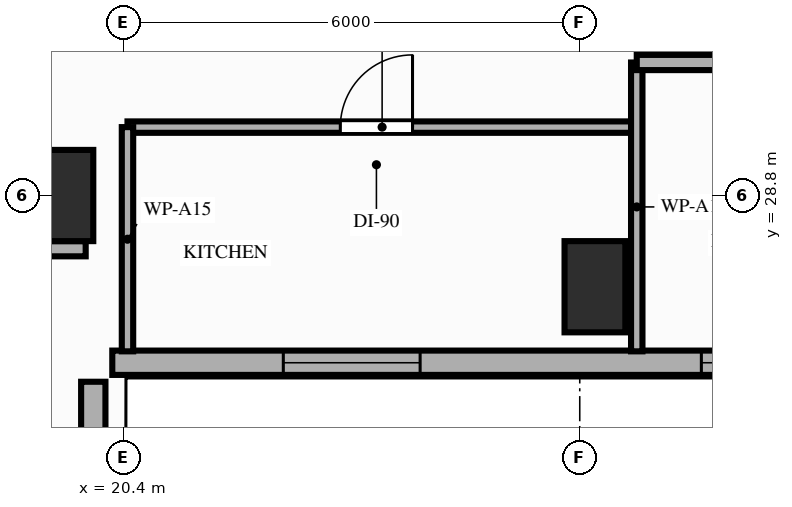
"""IFC4 building model, lengths in metres.
Left out: names, types, materials, properties, quantities, classifications, styles, units other than length and angle.
Written with IfcOpenShell. Run it as: python <this file> out.ifc"""

import sys

from ifc_helpers import new_model, si_unit, direction, frame, frame_2d, origin, origin_2d, place, context, subcontext, project, spatial, rectangle, extrude, element, fill, save


model = new_model("IFC4")
c1 = context("Model", 3, precision=1e-05, world=origin(), true_north=direction((0.0, 1.0)))
c2 = subcontext(c1, "Body", "Model", "MODEL_VIEW")
j1 = project(units=[si_unit("LENGTHUNIT", "METRE"), si_unit("PLANEANGLEUNIT", "RADIAN")], contexts=[c1])
p1 = place(None, origin())
s1 = spatial("IfcSite", under=j1, at=p1, CompositionType="ELEMENT")
p2 = place(p1, origin())
s2 = spatial("IfcBuilding", under=s1, at=p2, CompositionType="ELEMENT")
p3 = place(p2, frame((0.0, 0.0, 99.4)))
s3 = spatial("IfcBuildingStorey", under=s2, at=p3, CompositionType="ELEMENT", Elevation=99.4)
for number, where, z_axis, x_axis in (
    (1, (19.6, 28.8, 0.0), (0.0, 0.0, 1.0), (1.0, 0.0, 0.0)),
    (2, (26.6, 27.6, 0.0), (0.0, 0.0, 1.0), (1.0, 0.0, 0.0)),
):
    element("IfcColumn", number, at=place(p3, frame(where, z_axis=z_axis, x_axis=x_axis)), inside=s3, PredefinedType="COLUMN", context=c2, shape_type="SweptSolid", body=[
        extrude(rectangle(XDim=0.8, YDim=1.2, at=origin_2d()), origin(), (0.0, 0.0, 1.0), 3.2),
    ])
p4 = place(p3, frame((20.0, 8.8, 0.0), z_axis=(0.0, 0.0, 1.0), x_axis=(0.0, 1.0, 0.0)))
e3 = element("IfcWall", 3, at=p4, inside=s3, PredefinedType="STANDARD", context=c2, shape_type="SweptSolid", body=[
    extrude(rectangle(XDim=17.55, YDim=0.32, at=frame_2d((8.775, 0.0))), origin(), (0.0, 0.0, 1.0), 2.35),
])
p5 = place(p4, frame((7.22, 0.0, 0.85)))
e4 = element("IfcOpeningElement", 4, at=p5, cuts=e3, PredefinedType="OPENING", context=c2, shape_type="SweptSolid", body=[
    extrude(rectangle(XDim=1.1, YDim=1.25, at=frame_2d((0.55, 0.625))), frame((0.0, 0.17, 0.0), z_axis=(0.0, -1.0, 0.0), x_axis=(1.0, 0.0, 0.0)), (0.0, 0.0, 1.0), 0.34),
])
p6 = place(p4, frame((11.0, 0.0, 0.85)))
e5 = element("IfcOpeningElement", 5, at=p6, cuts=e3, PredefinedType="OPENING", context=c2, shape_type="SweptSolid", body=[
    extrude(rectangle(XDim=1.8, YDim=1.25, at=frame_2d((0.9, 0.625))), frame((0.0, 0.17, 0.0), z_axis=(0.0, -1.0, 0.0), x_axis=(1.0, 0.0, 0.0)), (0.0, 0.0, 1.0), 0.34),
])
p7 = place(p3, frame((20.25, 26.6, 0.0), z_axis=(0.0, 0.0, 1.0), x_axis=(1.0, 0.0, 0.0)))
e6 = element("IfcWall", 6, at=p7, inside=s3, PredefinedType="STANDARD", context=c2, shape_type="SweptSolid", body=[
    extrude(rectangle(XDim=26.15, YDim=0.32, at=frame_2d((13.075, 0.0))), origin(), (0.0, 0.0, 1.0), 2.96),
])
p8 = place(p7, frame((14.43, 0.0, 0.0)))
e7 = element("IfcOpeningElement", 7, at=p8, cuts=e6, PredefinedType="OPENING", context=c2, shape_type="SweptSolid", body=[
    extrude(rectangle(XDim=1.4, YDim=2.1, at=frame_2d((0.7, 1.05))), frame((0.0, 0.17, 0.0), z_axis=(0.0, -1.0, 0.0), x_axis=(1.0, 0.0, 0.0)), (0.0, 0.0, 1.0), 0.34),
])
p9 = place(p7, frame((2.25, 0.0, 0.85)))
e8 = element("IfcOpeningElement", 8, at=p9, cuts=e6, PredefinedType="OPENING", context=c2, shape_type="SweptSolid", body=[
    extrude(rectangle(XDim=1.8, YDim=1.75, at=frame_2d((0.9, 0.875))), frame((0.0, 0.17, 0.0), z_axis=(0.0, -1.0, 0.0), x_axis=(1.0, 0.0, 0.0)), (0.0, 0.0, 1.0), 0.34),
])
p10 = place(p7, frame((7.75, 0.0, 0.85)))
e9 = element("IfcOpeningElement", 9, at=p10, cuts=e6, PredefinedType="OPENING", context=c2, shape_type="SweptSolid", body=[
    extrude(rectangle(XDim=1.8, YDim=1.75, at=frame_2d((0.9, 0.875))), frame((0.0, 0.17, 0.0), z_axis=(0.0, -1.0, 0.0), x_axis=(1.0, 0.0, 0.0)), (0.0, 0.0, 1.0), 0.34),
])
p11 = place(p7, frame((22.25, 0.0, 0.85)))
e10 = element("IfcOpeningElement", 10, at=p11, cuts=e6, PredefinedType="OPENING", context=c2, shape_type="SweptSolid", body=[
    extrude(rectangle(XDim=1.8, YDim=1.75, at=frame_2d((0.9, 0.875))), frame((0.0, 0.17, 0.0), z_axis=(0.0, -1.0, 0.0), x_axis=(1.0, 0.0, 0.0)), (0.0, 0.0, 1.0), 0.34),
])
p12 = place(p3, frame((9.06, 28.1, 0.0), z_axis=(0.0, 0.0, 1.0), x_axis=(1.0, 0.0, 0.0)))
e11 = element("IfcWall", 11, at=p12, inside=s3, PredefinedType="PARTITIONING", context=c2, shape_type="SweptSolid", body=[
    extrude(rectangle(XDim=10.84, YDim=0.2, at=frame_2d((5.42, 0.0))), origin(), (0.0, 0.0, 1.0), 2.35),
])
p13 = place(p3, frame((20.45, 29.7, 0.0), z_axis=(0.0, 0.0, 1.0), x_axis=(1.0, 0.0, 0.0)))
e12 = element("IfcWall", 12, at=p13, inside=s3, PredefinedType="PARTITIONING", context=c2, shape_type="SweptSolid", body=[
    extrude(rectangle(XDim=6.7, YDim=0.15, at=frame_2d((3.35, 0.0))), origin(), (0.0, 0.0, 1.0), 2.96),
])
p14 = place(p13, frame((2.8, 0.0, 0.0)))
e13 = element("IfcOpeningElement", 13, at=p14, cuts=e12, PredefinedType="OPENING", context=c2, shape_type="SweptSolid", body=[
    extrude(rectangle(XDim=0.95, YDim=2.15, at=frame_2d((0.475, 1.075))), frame((0.0, 0.085, 0.0), z_axis=(0.0, -1.0, 0.0), x_axis=(1.0, 0.0, 0.0)), (0.0, 0.0, 1.0), 0.17),
])
p15 = place(p3, frame((20.45, 26.75, 0.0), z_axis=(0.0, 0.0, 1.0), x_axis=(0.0, 1.0, 0.0)))
e14 = element("IfcWall", 14, at=p15, inside=s3, PredefinedType="PARTITIONING", context=c2, shape_type="SweptSolid", body=[
    extrude(rectangle(XDim=2.95, YDim=0.15, at=frame_2d((1.475, 0.0))), origin(), (0.0, 0.0, 1.0), 2.35),
])
p16 = place(p3, frame((27.15, 26.75, 0.0), z_axis=(0.0, 0.0, 1.0), x_axis=(0.0, 1.0, 0.0)))
e15 = element("IfcWall", 15, at=p16, inside=s3, PredefinedType="PARTITIONING", context=c2, shape_type="SweptSolid", body=[
    extrude(rectangle(XDim=3.8, YDim=0.15, at=frame_2d((1.9, 0.0))), origin(), (0.0, 0.0, 1.0), 2.35),
])
p17 = place(p3, frame((27.15, 30.55, 0.0), z_axis=(0.0, 0.0, 1.0), x_axis=(1.0, 0.0, 0.0)))
e16 = element("IfcWall", 16, at=p17, inside=s3, PredefinedType="PARTITIONING", context=c2, shape_type="SweptSolid", body=[
    extrude(rectangle(XDim=14.55, YDim=0.2, at=frame_2d((7.275, 0.0))), origin(), (0.0, 0.0, 1.0), 2.35),
])
p18 = place(p17, frame((1.05, 0.0, 0.0)))
e17 = element("IfcOpeningElement", 17, at=p18, cuts=e16, PredefinedType="OPENING", context=c2, shape_type="SweptSolid", body=[
    extrude(rectangle(XDim=0.95, YDim=2.15, at=frame_2d((0.475, 1.075))), frame((0.0, 0.11, 0.0), z_axis=(0.0, -1.0, 0.0), x_axis=(1.0, 0.0, 0.0)), (0.0, 0.0, 1.0), 0.22),
])
p19 = place(p17, frame((4.4, 0.0, 0.0)))
e18 = element("IfcOpeningElement", 18, at=p19, cuts=e16, PredefinedType="OPENING", context=c2, shape_type="SweptSolid", body=[
    extrude(rectangle(XDim=0.95, YDim=2.15, at=frame_2d((0.475, 1.075))), frame((0.0, 0.11, 0.0), z_axis=(0.0, -1.0, 0.0), x_axis=(1.0, 0.0, 0.0)), (0.0, 0.0, 1.0), 0.22),
])
p20 = place(p17, frame((8.32, 0.0, 0.0)))
e19 = element("IfcOpeningElement", 19, at=p20, cuts=e16, PredefinedType="OPENING", context=c2, shape_type="SweptSolid", body=[
    extrude(rectangle(XDim=0.95, YDim=2.15, at=frame_2d((0.475, 1.075))), frame((0.0, 0.11, 0.0), z_axis=(0.0, -1.0, 0.0), x_axis=(1.0, 0.0, 0.0)), (0.0, 0.0, 1.0), 0.22),
])
p21 = place(p17, frame((12.25, 0.0, 0.0)))
e20 = element("IfcOpeningElement", 20, at=p21, cuts=e16, PredefinedType="OPENING", context=c2, shape_type="SweptSolid", body=[
    extrude(rectangle(XDim=0.95, YDim=2.15, at=frame_2d((0.475, 1.075))), frame((0.0, 0.11, 0.0), z_axis=(0.0, -1.0, 0.0), x_axis=(1.0, 0.0, 0.0)), (0.0, 0.0, 1.0), 0.22),
])
p22 = place(p9, origin())
e21 = element("IfcWindow", 21, at=p22, inside=s3, PartitioningType="SINGLE_PANEL", PredefinedType="WINDOW", context=c2, shape_type="SweptSolid", body=[
    extrude(rectangle(XDim=1.8, YDim=1.75, at=frame_2d((0.9, 0.875))), frame((0.0, 0.03, 0.0), z_axis=(0.0, -1.0, 0.0), x_axis=(1.0, 0.0, 0.0)), (0.0, 0.0, 1.0), 0.06),
])
fill(e8, e21)
p23 = place(p10, origin())
e22 = element("IfcWindow", 22, at=p23, inside=s3, PartitioningType="SINGLE_PANEL", PredefinedType="WINDOW", context=c2, shape_type="SweptSolid", body=[
    extrude(rectangle(XDim=1.8, YDim=1.75, at=frame_2d((0.9, 0.875))), frame((0.0, 0.03, 0.0), z_axis=(0.0, -1.0, 0.0), x_axis=(1.0, 0.0, 0.0)), (0.0, 0.0, 1.0), 0.06),
])
fill(e9, e22)
p24 = place(p14, origin())
e23 = element("IfcDoor", 23, at=p24, inside=s3, OperationType="SINGLE_SWING_RIGHT", PredefinedType="DOOR", context=c2, shape_type="SweptSolid", body=[
    extrude(rectangle(XDim=0.95, YDim=2.15, at=frame_2d((0.475, 1.075))), frame((0.0, 0.025, 0.0), z_axis=(0.0, -1.0, 0.0), x_axis=(1.0, 0.0, 0.0)), (0.0, 0.0, 1.0), 0.05),
])
fill(e13, e23)
save(model, sys.argv[1])
